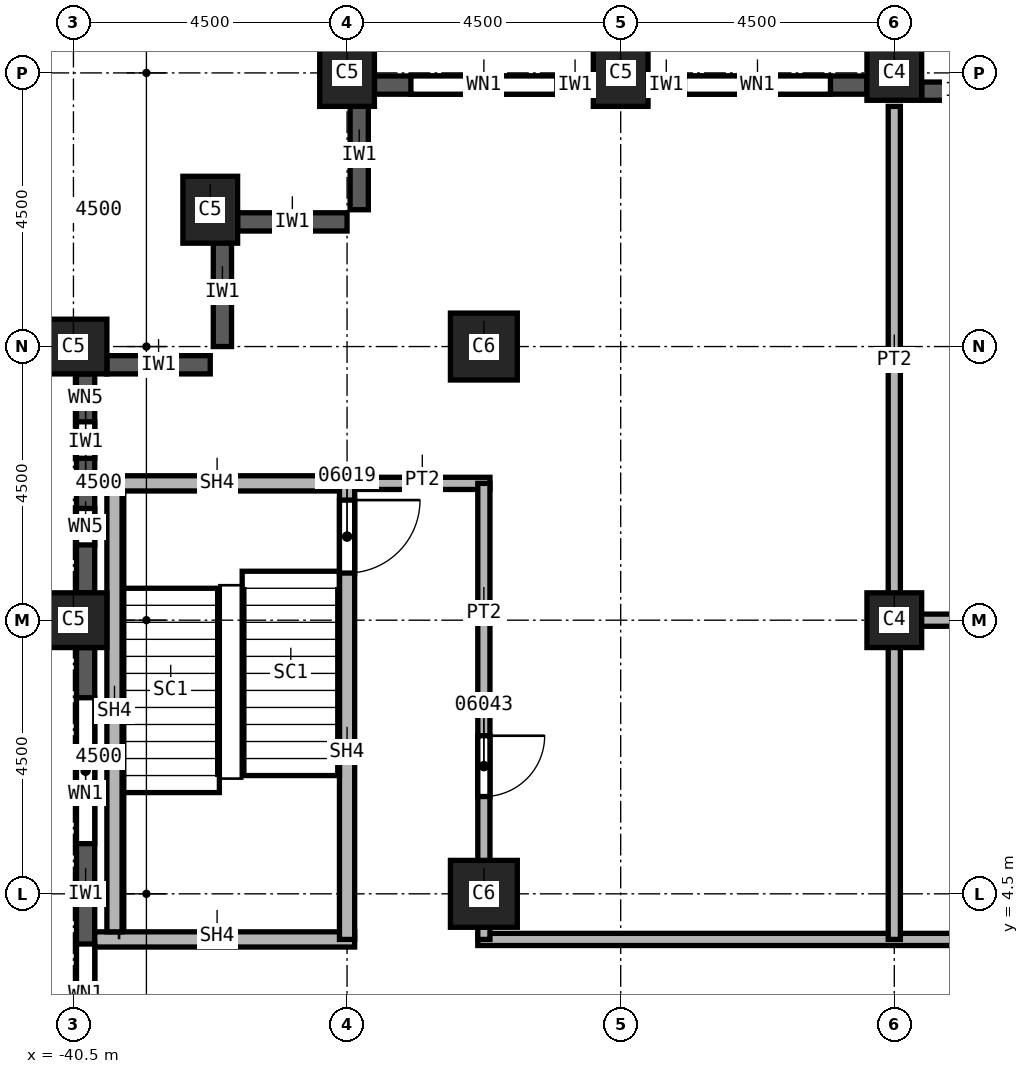
"""IFC4 building model, lengths in metres.
Left out: names, types, materials, properties, quantities, classifications, styles, units other than length and angle.
Written with IfcOpenShell. Run it as: python <this file> out.ifc"""

import sys

from ifc_helpers import new_model, si_unit, direction, frame, frame_2d, origin, origin_2d, place, context, subcontext, project, spatial, rectangle, extrude, element, fill, save


model = new_model("IFC4")
c1 = context("Model", 3, precision=1e-05, world=origin(), true_north=direction((0.0, 1.0)))
c2 = subcontext(c1, "Body", "Model", "MODEL_VIEW")
j1 = project(units=[si_unit("LENGTHUNIT", "METRE"), si_unit("PLANEANGLEUNIT", "RADIAN")], contexts=[c1])
p1 = place(None, origin())
s1 = spatial("IfcSite", under=j1, at=p1, CompositionType="ELEMENT")
p2 = place(p1, origin())
s2 = spatial("IfcBuilding", under=s1, at=p2, CompositionType="ELEMENT")
p3 = place(p2, frame((0.0, 0.0, 130.0)))
s3 = spatial("IfcBuildingStorey", under=s2, at=p3, CompositionType="ELEMENT", Elevation=130.0)
for number, where, z_axis, x_axis in (
    (1, (-40.5, 9.0, 0.0), (0.0, 0.0, 1.0), (0.0, 1.0, 0.0)),
    (2, (-40.5, 13.5, 0.0), (0.0, 0.0, 1.0), (0.0, 1.0, 0.0)),
    (3, (-38.25, 15.75, 0.0), (0.0, 0.0, 1.0), (1.0, 0.0, 0.0)),
    (4, (-31.5, 18.0, 0.0), (0.0, 0.0, 1.0), (1.0, 0.0, 0.0)),
    (5, (-36.0, 18.0, 0.0), (0.0, 0.0, 1.0), (1.0, 0.0, 0.0)),
):
    element("IfcColumn", number, at=place(p3, frame(where, z_axis=z_axis, x_axis=x_axis)), inside=s3, PredefinedType="COLUMN", context=c2, shape_type="SweptSolid", body=[
        extrude(rectangle(XDim=0.9, YDim=1.1, at=origin_2d()), origin(), (0.0, 0.0, 1.0), 3.7),
    ])
for number, where, z_axis, x_axis in (
    (6, (-33.75, 4.5, 0.0), (0.0, 0.0, 1.0), (1.0, 0.0, 0.0)),
    (7, (-33.75, 13.5, 0.0), (0.0, 0.0, 1.0), (1.0, 0.0, 0.0)),
):
    element("IfcColumn", number, at=place(p3, frame(where, z_axis=z_axis, x_axis=x_axis)), inside=s3, PredefinedType="COLUMN", context=c2, shape_type="SweptSolid", body=[
        extrude(rectangle(XDim=1.1, YDim=1.1, at=origin_2d()), origin(), (0.0, 0.0, 1.0), 3.7),
    ])
for number, where, z_axis, x_axis in (
    (8, (-27.0, 9.0, 0.0), (0.0, 0.0, 1.0), (1.0, 0.0, 0.0)),
    (9, (-27.0, 18.0, 0.0), (0.0, 0.0, 1.0), (1.0, 0.0, 0.0)),
):
    element("IfcColumn", number, at=place(p3, frame(where, z_axis=z_axis, x_axis=x_axis)), inside=s3, PredefinedType="COLUMN", context=c2, shape_type="SweptSolid", body=[
        extrude(rectangle(XDim=0.9, YDim=0.9, at=origin_2d()), origin(), (0.0, 0.0, 1.0), 3.7),
    ])
for number, where, z_axis, x_axis in (
    (10, (-35.8, 17.55, 0.0), (0.0, 0.0, 1.0), (0.0, -1.0, 0.0)),
    (11, (-37.8, 15.55, 0.0), (0.0, 0.0, 1.0), (1.0, 0.0, 0.0)),
    (12, (-38.05, 15.3, 0.0), (0.0, 0.0, 1.0), (0.0, -1.0, 0.0)),
):
    element("IfcWall", number, at=place(p3, frame(where, z_axis=z_axis, x_axis=x_axis)), inside=s3, PredefinedType="SOLIDWALL", context=c2, shape_type="SweptSolid", body=[
        extrude(rectangle(XDim=1.8, YDim=0.3, at=frame_2d((0.9, 0.0))), origin(), (0.0, 0.0, 1.0), 3.1),
    ])
p4 = place(p3, frame((-39.95, 13.2, 0.0), z_axis=(0.0, 0.0, 1.0), x_axis=(1.0, 0.0, 0.0)))
e13 = element("IfcWall", 13, at=p4, inside=s3, PredefinedType="SOLIDWALL", context=c2, shape_type="SweptSolid", body=[
    extrude(rectangle(XDim=1.7, YDim=0.3, at=frame_2d((0.85, 0.0))), origin(), (0.0, 0.0, 1.0), 3.1),
])
p5 = place(p3, frame((-25.2, 17.7, 0.0), z_axis=(0.0, 0.0, 1.0), x_axis=(-1.0, 0.0, 0.0)))
e14 = element("IfcWall", 14, at=p5, inside=s3, PredefinedType="SOLIDWALL", context=c2, shape_type="SweptSolid", body=[
    extrude(rectangle(XDim=1.35, YDim=0.3, at=frame_2d((0.675, 0.0))), origin(), (0.0, 0.0, 1.0), 3.1),
])
p6 = place(p3, frame((-27.45, 17.8, 0.0), z_axis=(0.0, 0.0, 1.0), x_axis=(-1.0, 0.0, 0.0)))
e15 = element("IfcWall", 15, at=p6, inside=s3, PredefinedType="SOLIDWALL", context=c2, shape_type="SweptSolid", body=[
    extrude(rectangle(XDim=3.6, YDim=0.3, at=frame_2d((1.8, 0.0))), origin(), (0.0, 0.0, 1.0), 3.1),
])
p7 = place(p6, frame((0.6, 0.0, 0.8)))
e16 = element("IfcOpeningElement", 16, at=p7, cuts=e15, PredefinedType="OPENING", context=c2, shape_type="SweptSolid", body=[
    extrude(rectangle(XDim=2.4, YDim=1.95, at=frame_2d((1.2, 0.975))), frame((0.0, 0.15, 0.0), z_axis=(0.0, -1.0, 0.0), x_axis=(1.0, 0.0, 0.0)), (0.0, 0.0, 1.0), 0.3),
])
p8 = place(p3, frame((-31.95, 17.8, 0.0), z_axis=(0.0, 0.0, 1.0), x_axis=(-1.0, 0.0, 0.0)))
e17 = element("IfcWall", 17, at=p8, inside=s3, PredefinedType="SOLIDWALL", context=c2, shape_type="SweptSolid", body=[
    extrude(rectangle(XDim=3.6, YDim=0.3, at=frame_2d((1.8, 0.0))), origin(), (0.0, 0.0, 1.0), 3.1),
])
p9 = place(p8, frame((0.6, 0.0, 0.8)))
e18 = element("IfcOpeningElement", 18, at=p9, cuts=e17, PredefinedType="OPENING", context=c2, shape_type="SweptSolid", body=[
    extrude(rectangle(XDim=2.4, YDim=1.95, at=frame_2d((1.2, 0.975))), frame((0.0, 0.15, 0.0), z_axis=(0.0, -1.0, 0.0), x_axis=(1.0, 0.0, 0.0)), (0.0, 0.0, 1.0), 0.3),
])
p10 = place(p3, frame((-40.3, 13.05, 0.0), z_axis=(0.0, 0.0, 1.0), x_axis=(0.0, -1.0, 0.0)))
e19 = element("IfcWall", 19, at=p10, inside=s3, PredefinedType="SOLIDWALL", context=c2, shape_type="SweptSolid", body=[
    extrude(rectangle(XDim=3.6, YDim=0.3, at=frame_2d((1.8, 0.0))), origin(), (0.0, 0.0, 1.0), 3.1),
])
p11 = place(p10, frame((0.788, 0.0, 0.8)))
e20 = element("IfcOpeningElement", 20, at=p11, cuts=e19, PredefinedType="OPENING", context=c2, shape_type="SweptSolid", body=[
    extrude(rectangle(XDim=0.6, YDim=1.95, at=frame_2d((0.3, 0.975))), frame((0.0, 0.15, 0.0), z_axis=(0.0, -1.0, 0.0), x_axis=(1.0, 0.0, 0.0)), (0.0, 0.0, 1.0), 0.3),
])
p12 = place(p10, frame((2.212, 0.0, 0.8)))
e21 = element("IfcOpeningElement", 21, at=p12, cuts=e19, PredefinedType="OPENING", context=c2, shape_type="SweptSolid", body=[
    extrude(rectangle(XDim=0.6, YDim=1.95, at=frame_2d((0.3, 0.975))), frame((0.0, 0.15, 0.0), z_axis=(0.0, -1.0, 0.0), x_axis=(1.0, 0.0, 0.0)), (0.0, 0.0, 1.0), 0.3),
])
p13 = place(p3, frame((-40.3, 8.55, 0.0), z_axis=(0.0, 0.0, 1.0), x_axis=(0.0, -1.0, 0.0)))
e22 = element("IfcWall", 22, at=p13, inside=s3, PredefinedType="SOLIDWALL", context=c2, shape_type="SweptSolid", body=[
    extrude(rectangle(XDim=8.1, YDim=0.3, at=frame_2d((4.05, 0.0))), origin(), (0.0, 0.0, 1.0), 3.1),
])
p14 = place(p13, frame((0.825, 0.0, 0.8)))
e23 = element("IfcOpeningElement", 23, at=p14, cuts=e22, PredefinedType="OPENING", context=c2, shape_type="SweptSolid", body=[
    extrude(rectangle(XDim=2.4, YDim=1.95, at=frame_2d((1.2, 0.975))), frame((0.0, 0.15, 0.0), z_axis=(0.0, -1.0, 0.0), x_axis=(1.0, 0.0, 0.0)), (0.0, 0.0, 1.0), 0.3),
])
p15 = place(p13, frame((4.875, 0.0, 0.8)))
e24 = element("IfcOpeningElement", 24, at=p15, cuts=e22, PredefinedType="OPENING", context=c2, shape_type="SweptSolid", body=[
    extrude(rectangle(XDim=2.4, YDim=1.95, at=frame_2d((1.2, 0.975))), frame((0.0, 0.15, 0.0), z_axis=(0.0, -1.0, 0.0), x_axis=(1.0, 0.0, 0.0)), (0.0, 0.0, 1.0), 0.3),
])
p16 = place(p3, frame((-36.0, 11.25, 0.0), z_axis=(0.0, 0.0, 1.0), x_axis=(1.0, 0.0, 0.0)))
e25 = element("IfcWall", 25, at=p16, inside=s3, PredefinedType="PARTITIONING", context=c2, shape_type="SweptSolid", body=[
    extrude(rectangle(XDim=2.35, YDim=0.2, at=frame_2d((1.175, 0.0))), origin(), (0.0, 0.0, 1.0), 3.7),
])
p17 = place(p3, frame((-33.85, 3.75, 0.0), z_axis=(0.0, 0.0, 1.0), x_axis=(1.0, 0.0, 0.0)))
e26 = element("IfcWall", 26, at=p17, inside=s3, PredefinedType="PARTITIONING", context=c2, shape_type="SweptSolid", body=[
    extrude(rectangle(XDim=18.45, YDim=0.2, at=frame_2d((9.225, 0.0))), origin(), (0.0, 0.0, 1.0), 3.7),
])
p18 = place(p17, frame((14.8, 0.0, 0.0)))
e27 = element("IfcOpeningElement", 27, at=p18, cuts=e26, PredefinedType="OPENING", context=c2, shape_type="SweptSolid", body=[
    extrude(rectangle(XDim=1.0, YDim=2.1, at=frame_2d((0.5, 1.05))), frame((0.0, 0.1, 0.0), z_axis=(0.0, -1.0, 0.0), x_axis=(1.0, 0.0, 0.0)), (0.0, 0.0, 1.0), 0.2),
])
p19 = place(p3, frame((-33.75, 11.25, 0.0), z_axis=(0.0, 0.0, 1.0), x_axis=(0.0, -1.0, 0.0)))
e28 = element("IfcWall", 28, at=p19, inside=s3, PredefinedType="PARTITIONING", context=c2, shape_type="SweptSolid", body=[
    extrude(rectangle(XDim=7.5, YDim=0.2, at=frame_2d((3.75, 0.0))), origin(), (0.0, 0.0, 1.0), 3.7),
])
p20 = place(p19, frame((4.15, 0.0, 0.0)))
e29 = element("IfcOpeningElement", 29, at=p20, cuts=e28, PredefinedType="OPENING", context=c2, shape_type="SweptSolid", body=[
    extrude(rectangle(XDim=1.0, YDim=2.1, at=frame_2d((0.5, 1.05))), frame((0.0, 0.1, 0.0), z_axis=(0.0, -1.0, 0.0), x_axis=(1.0, 0.0, 0.0)), (0.0, 0.0, 1.0), 0.2),
])
p21 = place(p3, frame((-27.1, 9.0, 0.0), z_axis=(0.0, 0.0, 1.0), x_axis=(1.0, 0.0, 0.0)))
e30 = element("IfcWall", 30, at=p21, inside=s3, PredefinedType="PARTITIONING", context=c2, shape_type="SweptSolid", body=[
    extrude(rectangle(XDim=11.7, YDim=0.2, at=frame_2d((5.85, 0.0))), origin(), (0.0, 0.0, 1.0), 3.7),
])
p22 = place(p3, frame((-27.0, 3.75, 0.0), z_axis=(0.0, 0.0, 1.0), x_axis=(0.0, 1.0, 0.0)))
e31 = element("IfcWall", 31, at=p22, inside=s3, PredefinedType="PARTITIONING", context=c2, shape_type="SweptSolid", body=[
    extrude(rectangle(XDim=13.7, YDim=0.2, at=frame_2d((6.85, 0.0))), origin(), (0.0, 0.0, 1.0), 3.7),
])
p23 = place(p3, frame((-40.15, 3.75, 0.0), z_axis=(0.0, 0.0, 1.0), x_axis=(1.0, 0.0, 0.0)))
e32 = element("IfcWall", 32, at=p23, inside=s3, PredefinedType="SOLIDWALL", context=c2, shape_type="SweptSolid", body=[
    extrude(rectangle(XDim=4.275, YDim=0.25, at=frame_2d((2.137, 0.0))), origin(), (0.0, 0.0, 1.0), 3.7),
])
p24 = place(p3, frame((-40.15, 11.25, 0.0), z_axis=(0.0, 0.0, 1.0), x_axis=(1.0, 0.0, 0.0)))
e33 = element("IfcWall", 33, at=p24, inside=s3, PredefinedType="SOLIDWALL", context=c2, shape_type="SweptSolid", body=[
    extrude(rectangle(XDim=4.15, YDim=0.25, at=frame_2d((2.075, 0.0))), origin(), (0.0, 0.0, 1.0), 3.7),
])
p25 = place(p3, frame((-36.0, 11.375, 0.0), z_axis=(0.0, 0.0, 1.0), x_axis=(0.0, -1.0, 0.0)))
e34 = element("IfcWall", 34, at=p25, inside=s3, PredefinedType="SOLIDWALL", context=c2, shape_type="SweptSolid", body=[
    extrude(rectangle(XDim=7.625, YDim=0.25, at=frame_2d((3.812, 0.0))), origin(), (0.0, 0.0, 1.0), 3.7),
])
p26 = place(p25, frame((0.4, 0.0, 0.0)))
e35 = element("IfcOpeningElement", 35, at=p26, cuts=e34, PredefinedType="OPENING", context=c2, shape_type="SweptSolid", body=[
    extrude(rectangle(XDim=1.2, YDim=2.1, at=frame_2d((0.6, 1.05))), frame((0.0, 0.125, 0.0), z_axis=(0.0, -1.0, 0.0), x_axis=(1.0, 0.0, 0.0)), (0.0, 0.0, 1.0), 0.25),
])
p27 = place(p3, frame((-39.825, 3.875, 0.0), z_axis=(0.0, 0.0, 1.0), x_axis=(0.0, 1.0, 0.0)))
e36 = element("IfcWall", 36, at=p27, inside=s3, PredefinedType="SOLIDWALL", context=c2, shape_type="SweptSolid", body=[
    extrude(rectangle(XDim=7.25, YDim=0.25, at=frame_2d((3.625, 0.0))), origin(), (0.0, 0.0, 1.0), 3.7),
])
p28 = place(p7, origin())
e37 = element("IfcWindow", 37, at=p28, inside=s3, PartitioningType="SINGLE_PANEL", PredefinedType="WINDOW", context=c2, shape_type="SweptSolid", body=[
    extrude(rectangle(XDim=2.4, YDim=1.95, at=frame_2d((1.2, 0.975))), frame((0.0, 0.03, 0.0), z_axis=(0.0, -1.0, 0.0), x_axis=(1.0, 0.0, 0.0)), (0.0, 0.0, 1.0), 0.06),
])
fill(e16, e37)
p29 = place(p9, origin())
e38 = element("IfcWindow", 38, at=p29, inside=s3, PartitioningType="SINGLE_PANEL", PredefinedType="WINDOW", context=c2, shape_type="SweptSolid", body=[
    extrude(rectangle(XDim=2.4, YDim=1.95, at=frame_2d((1.2, 0.975))), frame((0.0, 0.03, 0.0), z_axis=(0.0, -1.0, 0.0), x_axis=(1.0, 0.0, 0.0)), (0.0, 0.0, 1.0), 0.06),
])
fill(e18, e38)
p30 = place(p14, origin())
e39 = element("IfcWindow", 39, at=p30, inside=s3, PartitioningType="SINGLE_PANEL", PredefinedType="WINDOW", context=c2, shape_type="SweptSolid", body=[
    extrude(rectangle(XDim=2.4, YDim=1.95, at=frame_2d((1.2, 0.975))), frame((0.0, 0.03, 0.0), z_axis=(0.0, -1.0, 0.0), x_axis=(1.0, 0.0, 0.0)), (0.0, 0.0, 1.0), 0.06),
])
fill(e23, e39)
p31 = place(p15, origin())
e40 = element("IfcWindow", 40, at=p31, inside=s3, PartitioningType="SINGLE_PANEL", PredefinedType="WINDOW", context=c2, shape_type="SweptSolid", body=[
    extrude(rectangle(XDim=2.4, YDim=1.95, at=frame_2d((1.2, 0.975))), frame((0.0, 0.03, 0.0), z_axis=(0.0, -1.0, 0.0), x_axis=(1.0, 0.0, 0.0)), (0.0, 0.0, 1.0), 0.06),
])
fill(e24, e40)
p32 = place(p26, origin())
e41 = element("IfcDoor", 41, at=p32, inside=s3, OperationType="SINGLE_SWING_RIGHT", PredefinedType="DOOR", context=c2, shape_type="SweptSolid", body=[
    extrude(rectangle(XDim=1.2, YDim=2.1, at=frame_2d((0.6, 1.05))), frame((0.0, 0.025, 0.0), z_axis=(0.0, -1.0, 0.0), x_axis=(1.0, 0.0, 0.0)), (0.0, 0.0, 1.0), 0.05),
])
fill(e35, e41)
p33 = place(p20, origin())
e42 = element("IfcDoor", 42, at=p33, inside=s3, OperationType="SINGLE_SWING_RIGHT", PredefinedType="DOOR", context=c2, shape_type="SweptSolid", body=[
    extrude(rectangle(XDim=1.0, YDim=2.1, at=frame_2d((0.5, 1.05))), frame((0.0, 0.025, 0.0), z_axis=(0.0, -1.0, 0.0), x_axis=(1.0, 0.0, 0.0)), (0.0, 0.0, 1.0), 0.05),
])
fill(e29, e42)
p34 = place(p11, origin())
e43 = element("IfcWindow", 43, at=p34, inside=s3, PartitioningType="SINGLE_PANEL", PredefinedType="WINDOW", context=c2, shape_type="SweptSolid", body=[
    extrude(rectangle(XDim=0.6, YDim=1.95, at=frame_2d((0.3, 0.975))), frame((0.0, 0.03, 0.0), z_axis=(0.0, -1.0, 0.0), x_axis=(1.0, 0.0, 0.0)), (0.0, 0.0, 1.0), 0.06),
])
fill(e20, e43)
p35 = place(p12, origin())
e44 = element("IfcWindow", 44, at=p35, inside=s3, PartitioningType="SINGLE_PANEL", PredefinedType="WINDOW", context=c2, shape_type="SweptSolid", body=[
    extrude(rectangle(XDim=0.6, YDim=1.95, at=frame_2d((0.3, 0.975))), frame((0.0, 0.03, 0.0), z_axis=(0.0, -1.0, 0.0), x_axis=(1.0, 0.0, 0.0)), (0.0, 0.0, 1.0), 0.06),
])
fill(e21, e44)
save(model, sys.argv[1])
